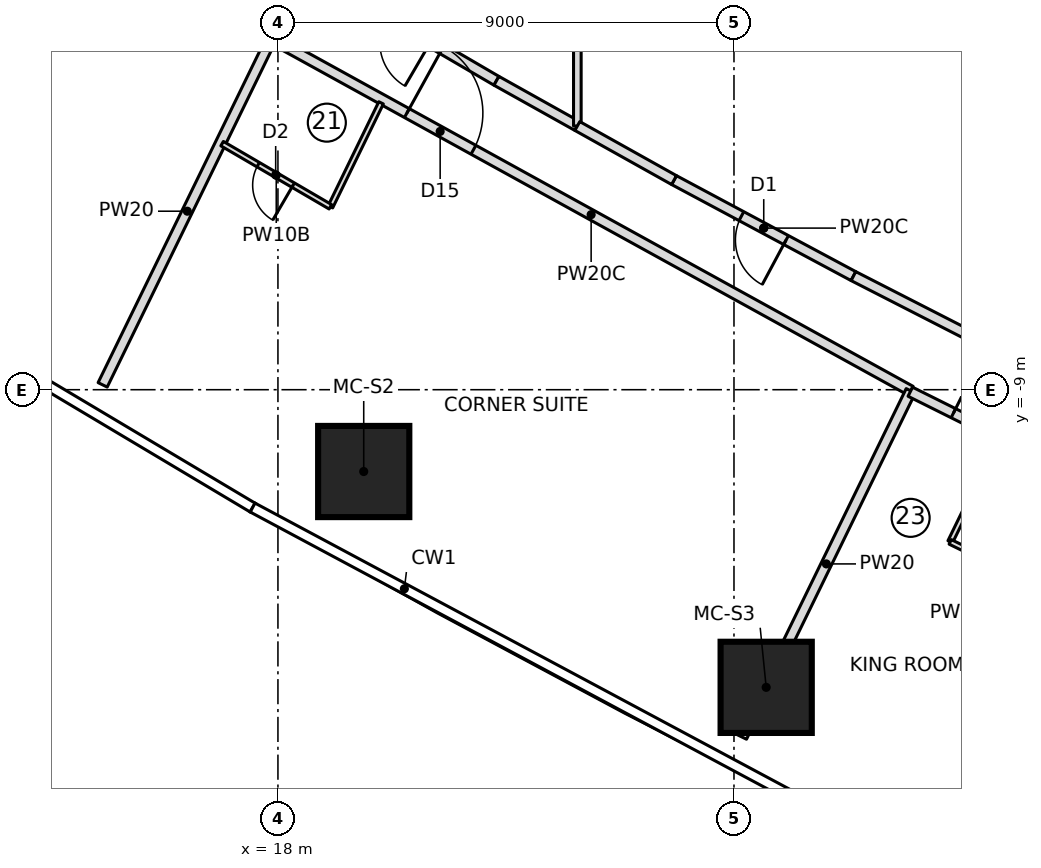
"""IFC4 building model, lengths in metres.
Left out: names, types, materials, properties, quantities, classifications, styles, units other than length and angle.
Written with IfcOpenShell. Run it as: python <this file> out.ifc"""

import sys

from ifc_helpers import new_model, si_unit, direction, frame, frame_2d, origin, origin_2d, place, context, subcontext, project, spatial, rectangle, extrude, element, fill, save


model = new_model("IFC4")
c1 = context("Model", 3, precision=1e-05, world=origin(), true_north=direction((0.0, 1.0)))
c2 = subcontext(c1, "Body", "Model", "MODEL_VIEW")
j1 = project(units=[si_unit("LENGTHUNIT", "METRE"), si_unit("PLANEANGLEUNIT", "RADIAN")], contexts=[c1])
p1 = place(None, origin())
s1 = spatial("IfcSite", under=j1, at=p1, CompositionType="ELEMENT")
p2 = place(p1, origin())
s2 = spatial("IfcBuilding", under=s1, at=p2, CompositionType="ELEMENT")
p3 = place(p2, frame((0.0, 0.0, 43.15)))
s3 = spatial("IfcBuildingStorey", under=s2, at=p3, CompositionType="ELEMENT", Elevation=43.15)
for number, where, z_axis, x_axis in (
    (1, (19.693, -10.615, 0.0), (0.0, 0.0, 1.0), (1.0, 0.0, 0.0)),
    (2, (27.635, -14.874, 0.0), (0.0, 0.0, 1.0), (1.0, 0.0, 0.0)),
):
    element("IfcColumn", number, at=place(p3, frame(where, z_axis=z_axis, x_axis=x_axis)), inside=s3, PredefinedType="COLUMN", context=c2, shape_type="SweptSolid", body=[
        extrude(rectangle(XDim=1.8, YDim=1.8, at=origin_2d()), origin(), (0.0, 0.0, 1.0), 3.55),
    ])
p4 = place(p3, frame((14.541, -8.904, 0.0), z_axis=(0.0, 0.0, 1.0), x_axis=(0.438213564788, 0.898870887078, 0.0)))
e3 = element("IfcWall", 3, at=p4, inside=s3, PredefinedType="PARTITIONING", context=c2, shape_type="SweptSolid", body=[
    extrude(rectangle(XDim=7.625, YDim=0.2, at=frame_2d((3.813, 0.0))), origin(), (0.0, 0.0, 1.0), 3.25),
])
p5 = place(p3, frame((17.874, -2.068, 0.0), z_axis=(0.0, 0.0, 1.0), x_axis=(0.875757832755, -0.482750679305, 0.0)))
e4 = element("IfcWall", 4, at=p5, inside=s3, PredefinedType="PARTITIONING", context=c2, shape_type="SweptSolid", body=[
    extrude(rectangle(XDim=14.405, YDim=0.2, at=frame_2d((7.202, 0.0))), origin(), (0.0, 0.0, 1.0), 3.25),
])
p6 = place(p5, frame((3.05, 0.0, 0.0)))
e5 = element("IfcOpeningElement", 5, at=p6, cuts=e4, PredefinedType="OPENING", context=c2, shape_type="SweptSolid", body=[
    extrude(rectangle(XDim=1.5, YDim=2.1, at=frame_2d((0.75, 1.05))), frame((0.0, 0.11, 0.0), z_axis=(0.0, -1.0, 0.0), x_axis=(1.0, 0.0, 0.0)), (0.0, 0.0, 1.0), 0.22),
])
p7 = place(p3, frame((20.035, -3.338, 0.0), z_axis=(0.0, 0.0, 1.0), x_axis=(-0.438122322582, -0.898915363344, 0.0)))
e6 = element("IfcWall", 6, at=p7, inside=s3, PredefinedType="PARTITIONING", context=c2, shape_type="SweptSolid", body=[
    extrude(rectangle(XDim=2.283, YDim=0.1, at=frame_2d((1.142, 0.0))), origin(), (0.0, 0.0, 1.0), 3.25),
])
p8 = place(p3, frame((19.035, -5.39, 0.0), z_axis=(0.0, 0.0, 1.0), x_axis=(-0.863707305865, 0.503993739837, 0.0)))
e7 = element("IfcWall", 7, at=p8, inside=s3, PredefinedType="PARTITIONING", context=c2, shape_type="SweptSolid", body=[
    extrude(rectangle(XDim=2.474, YDim=0.1, at=frame_2d((1.237, 0.0))), origin(), (0.0, 0.0, 1.0), 3.25),
])
p9 = place(p8, frame((0.85, 0.0, 0.0)))
e8 = element("IfcOpeningElement", 8, at=p9, cuts=e7, PredefinedType="OPENING", context=c2, shape_type="SweptSolid", body=[
    extrude(rectangle(XDim=0.8, YDim=2.1, at=frame_2d((0.4, 1.05))), frame((0.0, 0.06, 0.0), z_axis=(0.0, -1.0, 0.0), x_axis=(1.0, 0.0, 0.0)), (0.0, 0.0, 1.0), 0.12),
])
p10 = place(p3, frame((27.157, -15.854, 0.0), z_axis=(0.0, 0.0, 1.0), x_axis=(0.43822365664, 0.898865967072, 0.0)))
e9 = element("IfcWall", 9, at=p10, inside=s3, PredefinedType="PARTITIONING", context=c2, shape_type="SweptSolid", body=[
    extrude(rectangle(XDim=7.601, YDim=0.2, at=frame_2d((3.801, 0.0))), origin(), (0.0, 0.0, 1.0), 3.25),
])
p11 = place(p3, frame((30.48, -9.04, 0.0), z_axis=(0.0, 0.0, 1.0), x_axis=(0.894989913054, -0.446086376761, 0.0)))
e10 = element("IfcWall", 10, at=p11, inside=s3, PredefinedType="PARTITIONING", context=c2, shape_type="SweptSolid", body=[
    extrude(rectangle(XDim=4.506, YDim=0.2, at=frame_2d((2.253, 0.0))), origin(), (0.0, 0.0, 1.0), 3.25),
])
p12 = place(p11, frame((0.95, 0.0, 0.0)))
e11 = element("IfcOpeningElement", 11, at=p12, cuts=e10, PredefinedType="OPENING", context=c2, shape_type="SweptSolid", body=[
    extrude(rectangle(XDim=1.0, YDim=2.1, at=frame_2d((0.5, 1.05))), frame((0.0, 0.11, 0.0), z_axis=(0.0, -1.0, 0.0), x_axis=(1.0, 0.0, 0.0)), (0.0, 0.0, 1.0), 0.22),
])
p13 = place(p3, frame((31.267, -12.003, 0.0), z_axis=(0.0, 0.0, 1.0), x_axis=(0.438136931394, 0.898908243008, 0.0)))
e12 = element("IfcWall", 12, at=p13, inside=s3, PredefinedType="PARTITIONING", context=c2, shape_type="SweptSolid", body=[
    extrude(rectangle(XDim=1.51, YDim=0.1, at=frame_2d((0.755, 0.0))), origin(), (0.0, 0.0, 1.0), 3.25),
])
p14 = place(p3, frame((33.513, -13.101, 0.0), z_axis=(0.0, 0.0, 1.0), x_axis=(-0.89845285455, 0.439070003702, 0.0)))
e13 = element("IfcWall", 13, at=p14, inside=s3, PredefinedType="PARTITIONING", context=c2, shape_type="SweptSolid", body=[
    extrude(rectangle(XDim=2.5, YDim=0.1, at=frame_2d((1.25, 0.0))), origin(), (0.0, 0.0, 1.0), 3.25),
])
p15 = place(p14, frame((0.85, 0.0, 0.0)))
e14 = element("IfcOpeningElement", 14, at=p15, cuts=e13, PredefinedType="OPENING", context=c2, shape_type="SweptSolid", body=[
    extrude(rectangle(XDim=0.8, YDim=2.1, at=frame_2d((0.4, 1.05))), frame((0.0, 0.06, 0.0), z_axis=(0.0, -1.0, 0.0), x_axis=(1.0, 0.0, 0.0)), (0.0, 0.0, 1.0), 0.12),
])
p16 = place(p3, frame((31.191, -17.865, 0.0), z_axis=(0.0, 0.0, 1.0), x_axis=(0.438187612283, 0.898883538865, 0.0)))
e15 = element("IfcWall", 15, at=p16, inside=s3, PredefinedType="PARTITIONING", context=c2, shape_type="SweptSolid", body=[
    extrude(rectangle(XDim=7.582, YDim=0.2, at=frame_2d((3.791, 0.0))), origin(), (0.0, 0.0, 1.0), 3.25),
])
p17 = place(p3, frame((22.312, -2.903, 0.0), z_axis=(0.0, 0.0, 1.0), x_axis=(-0.863710538269, 0.503988200341, 0.0)))
e16 = element("IfcWall", 16, at=p17, inside=s3, PredefinedType="PARTITIONING", context=c2, shape_type="SweptSolid", body=[
    extrude(rectangle(XDim=4.016, YDim=0.2, at=frame_2d((2.008, 0.0))), origin(), (0.0, 0.0, 1.0), 3.25),
])
p18 = place(p17, frame((1.508, 0.0, 0.0)))
e17 = element("IfcOpeningElement", 17, at=p18, cuts=e16, PredefinedType="OPENING", context=c2, shape_type="SweptSolid", body=[
    extrude(rectangle(XDim=1.0, YDim=2.1, at=frame_2d((0.5, 1.05))), frame((0.0, 0.11, 0.0), z_axis=(0.0, -1.0, 0.0), x_axis=(1.0, 0.0, 0.0)), (0.0, 0.0, 1.0), 0.22),
])
p19 = place(p3, frame((23.909, -3.796, 0.0), z_axis=(0.0, 0.0, 1.0), x_axis=(-0.872813072418, 0.48805464921, 0.0)))
e18 = element("IfcWall", 18, at=p19, inside=s3, PredefinedType="PARTITIONING", context=c2, shape_type="SweptSolid", body=[
    extrude(rectangle(XDim=1.829, YDim=0.2, at=frame_2d((0.915, 0.0))), origin(), (0.0, 0.0, 1.0), 3.25),
])
p20 = place(p3, frame((23.909, -3.796, 0.0), z_axis=(0.0, 0.0, 1.0), x_axis=(0.0, 1.0, 0.0)))
e19 = element("IfcWall", 19, at=p20, inside=s3, PredefinedType="PARTITIONING", context=c2, shape_type="SweptSolid", body=[
    extrude(rectangle(XDim=7.592, YDim=0.15, at=frame_2d((3.796, 0.0))), origin(), (0.0, 0.0, 1.0), 3.25),
])
p21 = place(p3, frame((29.357, -6.758, 0.0), z_axis=(0.0, 0.0, 1.0), x_axis=(-0.881655245922, 0.471894084874, 0.0)))
e20 = element("IfcWall", 20, at=p21, inside=s3, PredefinedType="PARTITIONING", context=c2, shape_type="SweptSolid", body=[
    extrude(rectangle(XDim=4.016, YDim=0.2, at=frame_2d((2.008, 0.0))), origin(), (0.0, 0.0, 1.0), 3.25),
])
p22 = place(p21, frame((1.508, 0.0, 0.0)))
e21 = element("IfcOpeningElement", 21, at=p22, cuts=e20, PredefinedType="OPENING", context=c2, shape_type="SweptSolid", body=[
    extrude(rectangle(XDim=1.0, YDim=2.1, at=frame_2d((0.5, 1.05))), frame((0.0, 0.11, 0.0), z_axis=(0.0, -1.0, 0.0), x_axis=(1.0, 0.0, 0.0)), (0.0, 0.0, 1.0), 0.22),
])
p23 = place(p3, frame((31.95, -8.085, 0.0), z_axis=(0.0, 0.0, 1.0), x_axis=(-0.890213377055, 0.455543788579, 0.0)))
e22 = element("IfcWall", 22, at=p23, inside=s3, PredefinedType="PARTITIONING", context=c2, shape_type="SweptSolid", body=[
    extrude(rectangle(XDim=2.912, YDim=0.2, at=frame_2d((1.456, 0.0))), origin(), (0.0, 0.0, 1.0), 3.25),
])
p24 = place(p3, frame((25.817, -4.863, 0.0), z_axis=(0.0, 0.0, 1.0), x_axis=(-0.872789592901, 0.48809663646, 0.0)))
e23 = element("IfcWall", 23, at=p24, inside=s3, PredefinedType="PARTITIONING", context=c2, shape_type="SweptSolid", body=[
    extrude(rectangle(XDim=2.186, YDim=0.2, at=frame_2d((1.093, 0.0))), origin(), (0.0, 0.0, 1.0), 3.25),
])
p25 = place(p9, origin())
e24 = element("IfcDoor", 24, at=p25, inside=s3, OperationType="SINGLE_SWING_LEFT", PredefinedType="DOOR", context=c2, shape_type="SweptSolid", body=[
    extrude(rectangle(XDim=0.8, YDim=2.1, at=frame_2d((0.4, 1.05))), frame((0.0, 0.025, 0.0), z_axis=(0.0, -1.0, 0.0), x_axis=(1.0, 0.0, 0.0)), (0.0, 0.0, 1.0), 0.05),
])
fill(e8, e24)
p26 = place(p6, origin())
e25 = element("IfcDoor", 25, at=p26, inside=s3, OperationType="DOUBLE_DOOR_SINGLE_SWING", PredefinedType="DOOR", context=c2, shape_type="SweptSolid", body=[
    extrude(rectangle(XDim=1.5, YDim=2.1, at=frame_2d((0.75, 1.05))), frame((0.0, 0.025, 0.0), z_axis=(0.0, -1.0, 0.0), x_axis=(1.0, 0.0, 0.0)), (0.0, 0.0, 1.0), 0.05),
])
fill(e5, e25)
p27 = place(p12, origin())
e26 = element("IfcDoor", 26, at=p27, inside=s3, OperationType="SINGLE_SWING_LEFT", PredefinedType="DOOR", context=c2, shape_type="SweptSolid", body=[
    extrude(rectangle(XDim=1.0, YDim=2.1, at=frame_2d((0.5, 1.05))), frame((0.0, 0.025, 0.0), z_axis=(0.0, -1.0, 0.0), x_axis=(1.0, 0.0, 0.0)), (0.0, 0.0, 1.0), 0.05),
])
fill(e11, e26)
p28 = place(p22, origin())
e27 = element("IfcDoor", 27, at=p28, inside=s3, OperationType="SINGLE_SWING_LEFT", PredefinedType="DOOR", context=c2, shape_type="SweptSolid", body=[
    extrude(rectangle(XDim=1.0, YDim=2.1, at=frame_2d((0.5, 1.05))), frame((0.0, 0.025, 0.0), z_axis=(0.0, -1.0, 0.0), x_axis=(1.0, 0.0, 0.0)), (0.0, 0.0, 1.0), 0.05),
])
fill(e21, e27)
save(model, sys.argv[1])
